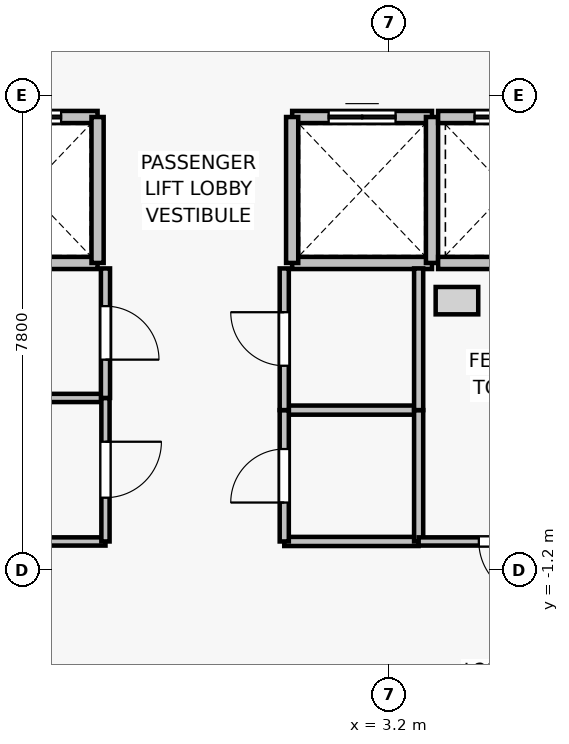
"""IFC4 building model, lengths in metres.
Left out: names, types, materials, properties, quantities, classifications, styles, units other than length and angle.
Written with IfcOpenShell. Run it as: python <this file> out.ifc"""

import sys

from ifc_helpers import new_model, si_unit, direction, frame, frame_2d, origin, place, context, subcontext, project, spatial, rectangle, extrude, source, transform, mapped, element, fill, save


model = new_model("IFC4")
c1 = context("Model", 3, precision=1e-05, world=origin(), true_north=direction((0.0, 1.0)))
c2 = subcontext(c1, "Body", "Model", "MODEL_VIEW")
j1 = project(units=[si_unit("LENGTHUNIT", "METRE"), si_unit("PLANEANGLEUNIT", "RADIAN")], contexts=[c1])
p1 = place(None, origin())
s1 = spatial("IfcSite", under=j1, at=p1, CompositionType="ELEMENT")
p2 = place(p1, origin())
s2 = spatial("IfcBuilding", under=s1, at=p2, CompositionType="ELEMENT")
p3 = place(p2, frame((0.0, 0.0, 86.8)))
s3 = spatial("IfcBuildingStorey", under=s2, at=p3, CompositionType="ELEMENT", Elevation=86.8)
p4 = place(p3, frame((-1.6, 3.85, 0.0), z_axis=(0.0, 0.0, 1.0), x_axis=(-1.0, 0.0, 0.0)))
e1 = element("IfcWall", 1, at=p4, inside=s3, PredefinedType="SOLIDWALL", context=c2, shape_type="SweptSolid", body=[
    extrude(rectangle(XDim=2.3, YDim=0.2, at=frame_2d((1.15, 0.0))), origin(), (0.0, 0.0, 1.0), 3.075),
])
p5 = place(p3, frame((-3.9, 6.25, 0.0), z_axis=(0.0, 0.0, 1.0), x_axis=(1.0, 0.0, 0.0)))
e2 = element("IfcWall", 2, at=p5, inside=s3, PredefinedType="SOLIDWALL", context=c2, shape_type="SweptSolid", body=[
    extrude(rectangle(XDim=2.3, YDim=0.2, at=frame_2d((1.15, 0.0))), origin(), (0.0, 0.0, 1.0), 3.075),
])
p6 = place(p5, frame((0.6, 0.0, 0.0)))
e3 = element("IfcOpeningElement", 3, at=p6, cuts=e2, PredefinedType="OPENING", context=c2, shape_type="SweptSolid", body=[
    extrude(rectangle(XDim=1.1, YDim=2.2, at=frame_2d((0.55, 1.1))), frame((0.0, 0.11, 0.0), z_axis=(0.0, -1.0, 0.0), x_axis=(1.0, 0.0, 0.0)), (0.0, 0.0, 1.0), 0.22),
])
p7 = place(p3, frame((-1.6, 6.25, 0.0), z_axis=(0.0, 0.0, 1.0), x_axis=(0.0, -1.0, 0.0)))
e4 = element("IfcWall", 4, at=p7, inside=s3, PredefinedType="SOLIDWALL", context=c2, shape_type="SweptSolid", body=[
    extrude(rectangle(XDim=2.4, YDim=0.2, at=frame_2d((1.2, 0.0))), origin(), (0.0, 0.0, 1.0), 3.075),
])
p8 = place(p3, frame((3.9, 3.85, 0.0), z_axis=(0.0, 0.0, 1.0), x_axis=(-1.0, 0.0, 0.0)))
e5 = element("IfcWall", 5, at=p8, inside=s3, PredefinedType="SOLIDWALL", context=c2, shape_type="SweptSolid", body=[
    extrude(rectangle(XDim=2.3, YDim=0.2, at=frame_2d((1.15, 0.0))), origin(), (0.0, 0.0, 1.0), 3.075),
])
p9 = place(p3, frame((1.6, 6.25, 0.0), z_axis=(0.0, 0.0, 1.0), x_axis=(1.0, 0.0, 0.0)))
e6 = element("IfcWall", 6, at=p9, inside=s3, PredefinedType="SOLIDWALL", context=c2, shape_type="SweptSolid", body=[
    extrude(rectangle(XDim=2.3, YDim=0.2, at=frame_2d((1.15, 0.0))), origin(), (0.0, 0.0, 1.0), 3.075),
])
p10 = place(p9, frame((0.6, 0.0, 0.0)))
e7 = element("IfcOpeningElement", 7, at=p10, cuts=e6, PredefinedType="OPENING", context=c2, shape_type="SweptSolid", body=[
    extrude(rectangle(XDim=1.1, YDim=2.2, at=frame_2d((0.55, 1.1))), frame((0.0, 0.11, 0.0), z_axis=(0.0, -1.0, 0.0), x_axis=(1.0, 0.0, 0.0)), (0.0, 0.0, 1.0), 0.22),
])
for number, where, z_axis, x_axis in (
    (8, (1.6, 3.85, 0.0), (0.0, 0.0, 1.0), (0.0, 1.0, 0.0)),
    (9, (3.9, 6.25, 0.0), (0.0, 0.0, 1.0), (0.0, -1.0, 0.0)),
):
    element("IfcWall", number, at=place(p3, frame(where, z_axis=z_axis, x_axis=x_axis)), inside=s3, PredefinedType="SOLIDWALL", context=c2, shape_type="SweptSolid", body=[
        extrude(rectangle(XDim=2.4, YDim=0.2, at=frame_2d((1.2, 0.0))), origin(), (0.0, 0.0, 1.0), 3.075),
    ])
p11 = place(p3, frame((6.3, 3.85, 0.0), z_axis=(0.0, 0.0, 1.0), x_axis=(-1.0, 0.0, 0.0)))
e10 = element("IfcWall", 10, at=p11, inside=s3, PredefinedType="SOLIDWALL", context=c2, shape_type="SweptSolid", body=[
    extrude(rectangle(XDim=2.3, YDim=0.2, at=frame_2d((1.15, 0.0))), origin(), (0.0, 0.0, 1.0), 3.075),
])
p12 = place(p3, frame((4.0, 6.25, 0.0), z_axis=(0.0, 0.0, 1.0), x_axis=(1.0, 0.0, 0.0)))
e11 = element("IfcWall", 11, at=p12, inside=s3, PredefinedType="SOLIDWALL", context=c2, shape_type="SweptSolid", body=[
    extrude(rectangle(XDim=2.3, YDim=0.2, at=frame_2d((1.15, 0.0))), origin(), (0.0, 0.0, 1.0), 3.075),
])
p13 = place(p12, frame((0.6, 0.0, 0.0)))
e12 = element("IfcOpeningElement", 12, at=p13, cuts=e11, PredefinedType="OPENING", context=c2, shape_type="SweptSolid", body=[
    extrude(rectangle(XDim=1.1, YDim=2.2, at=frame_2d((0.55, 1.1))), frame((0.0, 0.11, 0.0), z_axis=(0.0, -1.0, 0.0), x_axis=(1.0, 0.0, 0.0)), (0.0, 0.0, 1.0), 0.22),
])
for number, where, z_axis, x_axis in (
    (13, (-1.47, -0.73, 0.0), (0.0, 0.0, 1.0), (-1.0, 0.0, 0.0)),
    (14, (-3.47, 1.63, 0.0), (0.0, 0.0, 1.0), (1.0, 0.0, 0.0)),
):
    element("IfcWall", number, at=place(p3, frame(where, z_axis=z_axis, x_axis=x_axis)), inside=s3, PredefinedType="PARTITIONING", context=c2, shape_type="SweptSolid", body=[
        extrude(rectangle(XDim=2.0, YDim=0.135, at=frame_2d((1.0, 0.0))), origin(), (0.0, 0.0, 1.0), 3.075),
    ])
p14 = place(p3, frame((-1.47, 1.63, 0.0), z_axis=(0.0, 0.0, 1.0), x_axis=(0.0, -1.0, 0.0)))
e15 = element("IfcWall", 15, at=p14, inside=s3, PredefinedType="PARTITIONING", context=c2, shape_type="SweptSolid", body=[
    extrude(rectangle(XDim=2.36, YDim=0.135, at=frame_2d((1.18, 0.0))), origin(), (0.0, 0.0, 1.0), 3.075),
])
p15 = place(p14, frame((0.72, 0.0, 0.0)))
e16 = element("IfcOpeningElement", 16, at=p15, cuts=e15, PredefinedType="OPENING", context=c2, shape_type="SweptSolid", body=[
    extrude(rectangle(XDim=0.92, YDim=2.1, at=frame_2d((0.46, 1.05))), frame((0.0, 0.077, 0.0), z_axis=(0.0, -1.0, 0.0), x_axis=(1.0, 0.0, 0.0)), (0.0, 0.0, 1.0), 0.155),
])
p16 = place(p3, frame((-1.47, 3.76, 0.0), z_axis=(0.0, 0.0, 1.0), x_axis=(0.0, -1.0, 0.0)))
e17 = element("IfcWall", 17, at=p16, inside=s3, PredefinedType="PARTITIONING", context=c2, shape_type="SweptSolid", body=[
    extrude(rectangle(XDim=2.13, YDim=0.15, at=frame_2d((1.065, 0.0))), origin(), (0.0, 0.0, 1.0), 3.075),
])
p17 = place(p16, frame((0.62, 0.0, 0.0)))
e18 = element("IfcOpeningElement", 18, at=p17, cuts=e17, PredefinedType="OPENING", context=c2, shape_type="SweptSolid", body=[
    extrude(rectangle(XDim=0.88, YDim=2.1, at=frame_2d((0.44, 1.05))), frame((0.0, 0.085, 0.0), z_axis=(0.0, -1.0, 0.0), x_axis=(1.0, 0.0, 0.0)), (0.0, 0.0, 1.0), 0.17),
])
for number, where, z_axis, x_axis in (
    (19, (3.68, -0.73, 0.0), (0.0, 0.0, 1.0), (-1.0, 0.0, 0.0)),
    (20, (1.47, 1.43, 0.0), (0.0, 0.0, 1.0), (1.0, 0.0, 0.0)),
):
    element("IfcWall", number, at=place(p3, frame(where, z_axis=z_axis, x_axis=x_axis)), inside=s3, PredefinedType="PARTITIONING", context=c2, shape_type="SweptSolid", body=[
        extrude(rectangle(XDim=2.21, YDim=0.15, at=frame_2d((1.105, 0.0))), origin(), (0.0, 0.0, 1.0), 3.075),
    ])
p18 = place(p3, frame((1.47, -0.73, 0.0), z_axis=(0.0, 0.0, 1.0), x_axis=(0.0, 1.0, 0.0)))
e21 = element("IfcWall", 21, at=p18, inside=s3, PredefinedType="PARTITIONING", context=c2, shape_type="SweptSolid", body=[
    extrude(rectangle(XDim=2.16, YDim=0.15, at=frame_2d((1.08, 0.0))), origin(), (0.0, 0.0, 1.0), 3.075),
])
p19 = place(p18, frame((0.64, 0.0, 0.0)))
e22 = element("IfcOpeningElement", 22, at=p19, cuts=e21, PredefinedType="OPENING", context=c2, shape_type="SweptSolid", body=[
    extrude(rectangle(XDim=0.88, YDim=2.1, at=frame_2d((0.44, 1.05))), frame((0.0, 0.085, 0.0), z_axis=(0.0, -1.0, 0.0), x_axis=(1.0, 0.0, 0.0)), (0.0, 0.0, 1.0), 0.17),
])
p20 = place(p3, frame((3.68, 1.43, 0.0), z_axis=(0.0, 0.0, 1.0), x_axis=(0.0, -1.0, 0.0)))
e23 = element("IfcWall", 23, at=p20, inside=s3, PredefinedType="PARTITIONING", context=c2, shape_type="SweptSolid", body=[
    extrude(rectangle(XDim=2.16, YDim=0.15, at=frame_2d((1.08, 0.0))), origin(), (0.0, 0.0, 1.0), 3.075),
])
p21 = place(p3, frame((1.47, 1.43, 0.0), z_axis=(0.0, 0.0, 1.0), x_axis=(0.0, 1.0, 0.0)))
e24 = element("IfcWall", 24, at=p21, inside=s3, PredefinedType="PARTITIONING", context=c2, shape_type="SweptSolid", body=[
    extrude(rectangle(XDim=2.33, YDim=0.15, at=frame_2d((1.165, 0.0))), origin(), (0.0, 0.0, 1.0), 3.075),
])
p22 = place(p21, frame((0.73, 0.0, 0.0)))
e25 = element("IfcOpeningElement", 25, at=p22, cuts=e24, PredefinedType="OPENING", context=c2, shape_type="SweptSolid", body=[
    extrude(rectangle(XDim=0.88, YDim=2.15, at=frame_2d((0.44, 1.075))), frame((0.0, 0.085, 0.0), z_axis=(0.0, -1.0, 0.0), x_axis=(1.0, 0.0, 0.0)), (0.0, 0.0, 1.0), 0.17),
])
p23 = place(p3, frame((3.68, 3.76, 0.0), z_axis=(0.0, 0.0, 1.0), x_axis=(0.0, -1.0, 0.0)))
e26 = element("IfcWall", 26, at=p23, inside=s3, PredefinedType="PARTITIONING", context=c2, shape_type="SweptSolid", body=[
    extrude(rectangle(XDim=2.33, YDim=0.15, at=frame_2d((1.165, 0.0))), origin(), (0.0, 0.0, 1.0), 3.075),
])
p24 = place(p3, frame((6.58, -0.73, 0.0), z_axis=(0.0, 0.0, 1.0), x_axis=(-1.0, 0.0, 0.0)))
e27 = element("IfcWall", 27, at=p24, inside=s3, PredefinedType="PARTITIONING", context=c2, shape_type="SweptSolid", body=[
    extrude(rectangle(XDim=2.9, YDim=0.135, at=frame_2d((1.45, 0.0))), origin(), (0.0, 0.0, 1.0), 3.075),
])
p25 = place(p24, frame((0.99, 0.0, 0.0)))
e28 = element("IfcOpeningElement", 28, at=p25, cuts=e27, PredefinedType="OPENING", context=c2, shape_type="SweptSolid", body=[
    extrude(rectangle(XDim=0.92, YDim=2.1, at=frame_2d((0.46, 1.05))), frame((0.0, 0.077, 0.0), z_axis=(0.0, -1.0, 0.0), x_axis=(1.0, 0.0, 0.0)), (0.0, 0.0, 1.0), 0.155),
])
m1 = source(origin(), c2, "Body", "SweptSolid", [
    extrude(rectangle(XDim=1.1, YDim=2.2, at=frame_2d((0.55, 1.1))), frame((0.0, 0.025, 0.0), z_axis=(0.0, -1.0, 0.0), x_axis=(1.0, 0.0, 0.0)), (0.0, 0.0, 1.0), 0.05),
])
p26 = place(p6, origin())
e29 = element("IfcDoor", 29, at=p26, inside=s3, OperationType="DOUBLE_DOOR_SLIDING", PredefinedType="DOOR", context=c2, shape_type="MappedRepresentation", body=[
    mapped(m1, transform((0.0, 0.0, 0.0), x_axis=(1.0, 0.0, 0.0), y_axis=(0.0, 1.0, 0.0), z_axis=(0.0, 0.0, 1.0), scale=1.0)),
])
fill(e3, e29)
p27 = place(p10, origin())
e30 = element("IfcDoor", 30, at=p27, inside=s3, OperationType="DOUBLE_DOOR_SLIDING", PredefinedType="DOOR", context=c2, shape_type="MappedRepresentation", body=[
    mapped(m1, transform((0.0, 0.0, 0.0), x_axis=(1.0, 0.0, 0.0), y_axis=(0.0, 1.0, 0.0), z_axis=(0.0, 0.0, 1.0), scale=1.0)),
])
fill(e7, e30)
p28 = place(p13, origin())
e31 = element("IfcDoor", 31, at=p28, inside=s3, OperationType="DOUBLE_DOOR_SLIDING", PredefinedType="DOOR", context=c2, shape_type="MappedRepresentation", body=[
    mapped(m1, transform((0.0, 0.0, 0.0), x_axis=(1.0, 0.0, 0.0), y_axis=(0.0, 1.0, 0.0), z_axis=(0.0, 0.0, 1.0), scale=1.0)),
])
fill(e12, e31)
m2 = source(origin(), c2, "Body", "SweptSolid", [
    extrude(rectangle(XDim=0.92, YDim=2.1, at=frame_2d((0.46, 1.05))), frame((0.0, 0.025, 0.0), z_axis=(0.0, -1.0, 0.0), x_axis=(1.0, 0.0, 0.0)), (0.0, 0.0, 1.0), 0.05),
])
p29 = place(p15, origin())
e32 = element("IfcDoor", 32, at=p29, inside=s3, OperationType="SINGLE_SWING_LEFT", PredefinedType="DOOR", context=c2, shape_type="MappedRepresentation", body=[
    mapped(m2, transform((0.0, 0.0, 0.0), x_axis=(1.0, 0.0, 0.0), y_axis=(0.0, 1.0, 0.0), z_axis=(0.0, 0.0, 1.0), scale=1.0)),
])
fill(e16, e32)
m3 = source(origin(), c2, "Body", "SweptSolid", [
    extrude(rectangle(XDim=0.88, YDim=2.1, at=frame_2d((0.44, 1.05))), frame((0.0, 0.025, 0.0), z_axis=(0.0, -1.0, 0.0), x_axis=(1.0, 0.0, 0.0)), (0.0, 0.0, 1.0), 0.05),
])
p30 = place(p17, origin())
e33 = element("IfcDoor", 33, at=p30, inside=s3, OperationType="SINGLE_SWING_RIGHT", PredefinedType="DOOR", context=c2, shape_type="MappedRepresentation", body=[
    mapped(m3, transform((0.0, 0.0, 0.0), x_axis=(1.0, 0.0, 0.0), y_axis=(0.0, 1.0, 0.0), z_axis=(0.0, 0.0, 1.0), scale=1.0)),
])
fill(e18, e33)
p31 = place(p19, origin())
e34 = element("IfcDoor", 34, at=p31, inside=s3, OperationType="SINGLE_SWING_LEFT", PredefinedType="DOOR", context=c2, shape_type="MappedRepresentation", body=[
    mapped(m3, transform((0.0, 0.0, 0.0), x_axis=(1.0, 0.0, 0.0), y_axis=(0.0, 1.0, 0.0), z_axis=(0.0, 0.0, 1.0), scale=1.0)),
])
fill(e22, e34)
m4 = source(origin(), c2, "Body", "SweptSolid", [
    extrude(rectangle(XDim=0.88, YDim=2.15, at=frame_2d((0.44, 1.075))), frame((0.0, 0.025, 0.0), z_axis=(0.0, -1.0, 0.0), x_axis=(1.0, 0.0, 0.0)), (0.0, 0.0, 1.0), 0.05),
])
p32 = place(p22, origin())
e35 = element("IfcDoor", 35, at=p32, inside=s3, OperationType="SINGLE_SWING_RIGHT", PredefinedType="DOOR", context=c2, shape_type="MappedRepresentation", body=[
    mapped(m4, transform((0.0, 0.0, 0.0), x_axis=(1.0, 0.0, 0.0), y_axis=(0.0, 1.0, 0.0), z_axis=(0.0, 0.0, 1.0), scale=1.0)),
])
fill(e25, e35)
p33 = place(p25, origin())
e36 = element("IfcDoor", 36, at=p33, inside=s3, OperationType="SINGLE_SWING_LEFT", PredefinedType="DOOR", context=c2, shape_type="MappedRepresentation", body=[
    mapped(m2, transform((0.0, 0.0, 0.0), x_axis=(1.0, 0.0, 0.0), y_axis=(0.0, 1.0, 0.0), z_axis=(0.0, 0.0, 1.0), scale=1.0)),
])
fill(e28, e36)
save(model, sys.argv[1])
